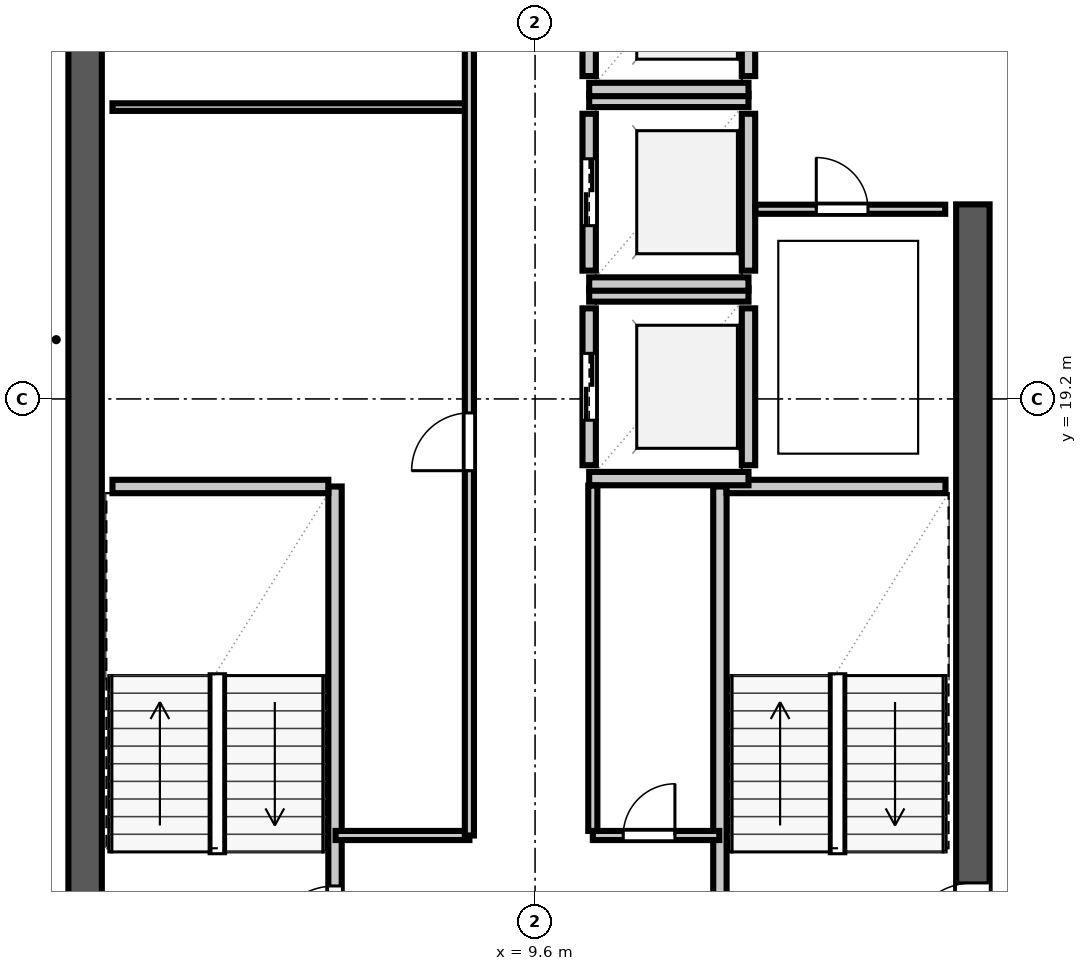
"""IFC4 building model, lengths in metres.
Left out: names, types, materials, properties, quantities, classifications, styles, units other than length and angle.
Written with IfcOpenShell. Run it as: python <this file> out.ifc"""

import sys

from ifc_helpers import new_model, si_unit, direction, frame, frame_2d, origin, place, context, subcontext, project, spatial, rectangle, extrude, element, fill, save


model = new_model("IFC4")
c1 = context("Model", 3, precision=1e-05, world=origin(), true_north=direction((0.0, 1.0)))
c2 = subcontext(c1, "Body", "Model", "MODEL_VIEW")
j1 = project(units=[si_unit("LENGTHUNIT", "METRE"), si_unit("PLANEANGLEUNIT", "RADIAN")], contexts=[c1])
p1 = place(None, origin())
s1 = spatial("IfcSite", under=j1, at=p1, CompositionType="ELEMENT")
p2 = place(p1, origin())
s2 = spatial("IfcBuilding", under=s1, at=p2, CompositionType="ELEMENT")
p3 = place(p2, frame((0.0, 0.0, 277.2)))
s3 = spatial("IfcBuildingStorey", under=s2, at=p3, CompositionType="ELEMENT", Elevation=277.2)
p4 = place(p3, frame((2.2, 9.325, 0.0), z_axis=(0.0, 0.0, 1.0), x_axis=(0.0, 1.0, 0.0)))
e1 = element("IfcWall", 1, at=p4, inside=s3, PredefinedType="SHEAR", context=c2, shape_type="SweptSolid", body=[
    extrude(rectangle(XDim=38.95, YDim=0.55, at=frame_2d((19.475, 0.0))), origin(), (0.0, 0.0, 1.0), 3.54),
])
p5 = place(p3, frame((16.8, 9.875, 0.0), z_axis=(0.0, 0.0, 1.0), x_axis=(0.0, 1.0, 0.0)))
e2 = element("IfcWall", 2, at=p5, inside=s3, PredefinedType="SHEAR", context=c2, shape_type="SweptSolid", body=[
    extrude(rectangle(XDim=12.525, YDim=0.55, at=frame_2d((6.262, 0.0))), origin(), (0.0, 0.0, 1.0), 3.54),
])
p6 = place(p5, frame((0.265, 0.0, 0.0)))
e3 = element("IfcOpeningElement", 3, at=p6, cuts=e2, PredefinedType="OPENING", context=c2, shape_type="SweptSolid", body=[
    extrude(rectangle(XDim=1.1, YDim=2.2, at=frame_2d((0.55, 1.1))), frame((0.0, 0.287, 0.0), z_axis=(0.0, -1.0, 0.0), x_axis=(1.0, 0.0, 0.0)), (0.0, 0.0, 1.0), 0.574),
])
p7 = place(p3, frame((6.31, 9.95, 0.0), z_axis=(0.0, 0.0, 1.0), x_axis=(0.0, 1.0, 0.0)))
e4 = element("IfcWall", 4, at=p7, inside=s3, PredefinedType="SOLIDWALL", context=c2, shape_type="SweptSolid", body=[
    extrude(rectangle(XDim=7.81, YDim=0.22, at=frame_2d((3.905, 0.0))), origin(), (0.0, 0.0, 1.0), 3.54),
])
p8 = place(p7, frame((0.14, 0.0, 0.0)))
e5 = element("IfcOpeningElement", 5, at=p8, cuts=e4, PredefinedType="OPENING", context=c2, shape_type="SweptSolid", body=[
    extrude(rectangle(XDim=1.1, YDim=2.2, at=frame_2d((0.55, 1.1))), frame((0.0, 0.122, 0.0), z_axis=(0.0, -1.0, 0.0), x_axis=(1.0, 0.0, 0.0)), (0.0, 0.0, 1.0), 0.244),
])
p9 = place(p3, frame((2.65, 17.76, 0.0), z_axis=(0.0, 0.0, 1.0), x_axis=(1.0, 0.0, 0.0)))
e6 = element("IfcWall", 6, at=p9, inside=s3, PredefinedType="SOLIDWALL", context=c2, shape_type="SweptSolid", body=[
    extrude(rectangle(XDim=3.55, YDim=0.22, at=frame_2d((1.775, 0.0))), origin(), (0.0, 0.0, 1.0), 3.54),
])
p10 = place(p3, frame((12.64, 10.05, 0.0), z_axis=(0.0, 0.0, 1.0), x_axis=(0.0, 1.0, 0.0)))
e7 = element("IfcWall", 7, at=p10, inside=s3, PredefinedType="SOLIDWALL", context=c2, shape_type="SweptSolid", body=[
    extrude(rectangle(XDim=7.71, YDim=0.22, at=frame_2d((3.855, 0.0))), origin(), (0.0, 0.0, 1.0), 3.54),
])
p11 = place(p3, frame((12.75, 17.76, 0.0), z_axis=(0.0, 0.0, 1.0), x_axis=(1.0, 0.0, 0.0)))
e8 = element("IfcWall", 8, at=p11, inside=s3, PredefinedType="SOLIDWALL", context=c2, shape_type="SweptSolid", body=[
    extrude(rectangle(XDim=3.6, YDim=0.22, at=frame_2d((1.8, 0.0))), origin(), (0.0, 0.0, 1.0), 3.54),
])
p12 = place(p3, frame((10.49, 18.11, 0.0), z_axis=(0.0, 0.0, 1.0), x_axis=(0.0, 1.0, 0.0)))
e9 = element("IfcWall", 9, at=p12, inside=s3, PredefinedType="SOLIDWALL", context=c2, shape_type="SweptSolid", body=[
    extrude(rectangle(XDim=2.58, YDim=0.22, at=frame_2d((1.29, 0.0))), origin(), (0.0, 0.0, 1.0), 3.54),
])
p13 = place(p12, frame((0.74, 0.0, 0.0)))
e10 = element("IfcOpeningElement", 10, at=p13, cuts=e9, PredefinedType="OPENING", context=c2, shape_type="SweptSolid", body=[
    extrude(rectangle(XDim=1.1, YDim=2.2, at=frame_2d((0.55, 1.1))), frame((0.0, 0.122, 0.0), z_axis=(0.0, -1.0, 0.0), x_axis=(1.0, 0.0, 0.0)), (0.0, 0.0, 1.0), 0.244),
])
p14 = place(p3, frame((13.11, 18.11, 0.0), z_axis=(0.0, 0.0, 1.0), x_axis=(0.0, 1.0, 0.0)))
e11 = element("IfcWall", 11, at=p14, inside=s3, PredefinedType="SOLIDWALL", context=c2, shape_type="SweptSolid", body=[
    extrude(rectangle(XDim=2.58, YDim=0.22, at=frame_2d((1.29, 0.0))), origin(), (0.0, 0.0, 1.0), 3.54),
])
for number, where, z_axis, x_axis in (
    (12, (10.49, 17.89, 0.0), (0.0, 0.0, 1.0), (1.0, 0.0, 0.0)),
    (13, (10.49, 20.91, 0.0), (0.0, 0.0, 1.0), (1.0, 0.0, 0.0)),
):
    element("IfcWall", number, at=place(p3, frame(where, z_axis=z_axis, x_axis=x_axis)), inside=s3, PredefinedType="SOLIDWALL", context=c2, shape_type="SweptSolid", body=[
        extrude(rectangle(XDim=2.62, YDim=0.22, at=frame_2d((1.31, 0.0))), origin(), (0.0, 0.0, 1.0), 3.54),
    ])
p15 = place(p3, frame((10.49, 21.31, 0.0), z_axis=(0.0, 0.0, 1.0), x_axis=(0.0, 1.0, 0.0)))
e14 = element("IfcWall", 14, at=p15, inside=s3, PredefinedType="SOLIDWALL", context=c2, shape_type="SweptSolid", body=[
    extrude(rectangle(XDim=2.58, YDim=0.22, at=frame_2d((1.29, 0.0))), origin(), (0.0, 0.0, 1.0), 3.54),
])
p16 = place(p15, frame((0.74, 0.0, 0.0)))
e15 = element("IfcOpeningElement", 15, at=p16, cuts=e14, PredefinedType="OPENING", context=c2, shape_type="SweptSolid", body=[
    extrude(rectangle(XDim=1.1, YDim=2.2, at=frame_2d((0.55, 1.1))), frame((0.0, 0.122, 0.0), z_axis=(0.0, -1.0, 0.0), x_axis=(1.0, 0.0, 0.0)), (0.0, 0.0, 1.0), 0.244),
])
p17 = place(p3, frame((13.11, 21.31, 0.0), z_axis=(0.0, 0.0, 1.0), x_axis=(0.0, 1.0, 0.0)))
e16 = element("IfcWall", 16, at=p17, inside=s3, PredefinedType="SOLIDWALL", context=c2, shape_type="SweptSolid", body=[
    extrude(rectangle(XDim=2.58, YDim=0.22, at=frame_2d((1.29, 0.0))), origin(), (0.0, 0.0, 1.0), 3.54),
])
for number, where, z_axis, x_axis in (
    (17, (10.49, 21.09, 0.0), (0.0, 0.0, 1.0), (1.0, 0.0, 0.0)),
    (18, (10.49, 24.11, 0.0), (0.0, 0.0, 1.0), (1.0, 0.0, 0.0)),
):
    element("IfcWall", number, at=place(p3, frame(where, z_axis=z_axis, x_axis=x_axis)), inside=s3, PredefinedType="SOLIDWALL", context=c2, shape_type="SweptSolid", body=[
        extrude(rectangle(XDim=2.62, YDim=0.22, at=frame_2d((1.31, 0.0))), origin(), (0.0, 0.0, 1.0), 3.54),
    ])
p18 = place(p3, frame((10.49, 24.51, 0.0), z_axis=(0.0, 0.0, 1.0), x_axis=(0.0, 1.0, 0.0)))
e19 = element("IfcWall", 19, at=p18, inside=s3, PredefinedType="SOLIDWALL", context=c2, shape_type="SweptSolid", body=[
    extrude(rectangle(XDim=2.58, YDim=0.22, at=frame_2d((1.29, 0.0))), origin(), (0.0, 0.0, 1.0), 3.54),
])
p19 = place(p18, frame((0.74, 0.0, 0.0)))
e20 = element("IfcOpeningElement", 20, at=p19, cuts=e19, PredefinedType="OPENING", context=c2, shape_type="SweptSolid", body=[
    extrude(rectangle(XDim=1.1, YDim=2.2, at=frame_2d((0.55, 1.1))), frame((0.0, 0.122, 0.0), z_axis=(0.0, -1.0, 0.0), x_axis=(1.0, 0.0, 0.0)), (0.0, 0.0, 1.0), 0.244),
])
p20 = place(p3, frame((13.11, 24.51, 0.0), z_axis=(0.0, 0.0, 1.0), x_axis=(0.0, 1.0, 0.0)))
e21 = element("IfcWall", 21, at=p20, inside=s3, PredefinedType="SOLIDWALL", context=c2, shape_type="SweptSolid", body=[
    extrude(rectangle(XDim=2.58, YDim=0.22, at=frame_2d((1.29, 0.0))), origin(), (0.0, 0.0, 1.0), 3.54),
])
p21 = place(p3, frame((10.49, 24.29, 0.0), z_axis=(0.0, 0.0, 1.0), x_axis=(1.0, 0.0, 0.0)))
e22 = element("IfcWall", 22, at=p21, inside=s3, PredefinedType="SOLIDWALL", context=c2, shape_type="SweptSolid", body=[
    extrude(rectangle(XDim=2.62, YDim=0.22, at=frame_2d((1.31, 0.0))), origin(), (0.0, 0.0, 1.0), 3.54),
])
p22 = place(p3, frame((10.55, 12.02, 0.0), z_axis=(0.0, 0.0, 1.0), x_axis=(1.0, 0.0, 0.0)))
e23 = element("IfcWall", 23, at=p22, inside=s3, PredefinedType="PARTITIONING", context=c2, shape_type="SweptSolid", body=[
    extrude(rectangle(XDim=2.08, YDim=0.15, at=frame_2d((1.04, 0.0))), origin(), (0.0, 0.0, 1.0), 3.54),
])
p23 = place(p22, frame((0.5, 0.0, 0.0)))
e24 = element("IfcOpeningElement", 24, at=p23, cuts=e23, PredefinedType="OPENING", context=c2, shape_type="SweptSolid", body=[
    extrude(rectangle(XDim=0.85, YDim=2.1, at=frame_2d((0.425, 1.05))), frame((0.0, 0.087, 0.0), z_axis=(0.0, -1.0, 0.0), x_axis=(1.0, 0.0, 0.0)), (0.0, 0.0, 1.0), 0.174),
])
p24 = place(p3, frame((10.55, 12.095, 0.0), z_axis=(0.0, 0.0, 1.0), x_axis=(0.0, 1.0, 0.0)))
e25 = element("IfcWall", 25, at=p24, inside=s3, PredefinedType="PARTITIONING", context=c2, shape_type="SweptSolid", body=[
    extrude(rectangle(XDim=5.68, YDim=0.15, at=frame_2d((2.84, 0.0))), origin(), (0.0, 0.0, 1.0), 3.54),
])
p25 = place(p3, frame((13.225, 22.32, 0.0), z_axis=(0.0, 0.0, 1.0), x_axis=(1.0, 0.0, 0.0)))
e26 = element("IfcWall", 26, at=p25, inside=s3, PredefinedType="PARTITIONING", context=c2, shape_type="SweptSolid", body=[
    extrude(rectangle(XDim=3.12, YDim=0.15, at=frame_2d((1.56, 0.0))), origin(), (0.0, 0.0, 1.0), 3.54),
])
p26 = place(p25, frame((1.0, 0.0, 0.0)))
e27 = element("IfcOpeningElement", 27, at=p26, cuts=e26, PredefinedType="OPENING", context=c2, shape_type="SweptSolid", body=[
    extrude(rectangle(XDim=0.85, YDim=2.1, at=frame_2d((0.425, 1.05))), frame((0.0, 0.087, 0.0), z_axis=(0.0, -1.0, 0.0), x_axis=(1.0, 0.0, 0.0)), (0.0, 0.0, 1.0), 0.174),
])
p27 = place(p3, frame((6.32, 12.02, 0.0), z_axis=(0.0, 0.0, 1.0), x_axis=(1.0, 0.0, 0.0)))
e28 = element("IfcWall", 28, at=p27, inside=s3, PredefinedType="PARTITIONING", context=c2, shape_type="SweptSolid", body=[
    extrude(rectangle(XDim=2.2, YDim=0.15, at=frame_2d((1.1, 0.0))), origin(), (0.0, 0.0, 1.0), 3.54),
])
p28 = place(p3, frame((2.65, 24.0, 0.0), z_axis=(0.0, 0.0, 1.0), x_axis=(1.0, 0.0, 0.0)))
e29 = element("IfcWall", 29, at=p28, inside=s3, PredefinedType="PARTITIONING", context=c2, shape_type="SweptSolid", body=[
    extrude(rectangle(XDim=5.87, YDim=0.125, at=frame_2d((2.935, 0.0))), origin(), (0.0, 0.0, 1.0), 3.54),
])
p29 = place(p3, frame((8.52, 12.02, 0.0), z_axis=(0.0, 0.0, 1.0), x_axis=(0.0, 1.0, 0.0)))
e30 = element("IfcWall", 30, at=p29, inside=s3, PredefinedType="PARTITIONING", context=c2, shape_type="SweptSolid", body=[
    extrude(rectangle(XDim=24.76, YDim=0.15, at=frame_2d((12.38, 0.0))), origin(), (0.0, 0.0, 1.0), 3.54),
])
p30 = place(p29, frame((6.0, 0.0, 0.0)))
e31 = element("IfcOpeningElement", 31, at=p30, cuts=e30, PredefinedType="OPENING", context=c2, shape_type="SweptSolid", body=[
    extrude(rectangle(XDim=0.95, YDim=2.15, at=frame_2d((0.475, 1.075))), frame((0.0, 0.087, 0.0), z_axis=(0.0, -1.0, 0.0), x_axis=(1.0, 0.0, 0.0)), (0.0, 0.0, 1.0), 0.174),
])
p31 = place(p29, frame((14.0, 0.0, 0.0)))
e32 = element("IfcOpeningElement", 32, at=p31, cuts=e30, PredefinedType="OPENING", context=c2, shape_type="SweptSolid", body=[
    extrude(rectangle(XDim=0.95, YDim=2.15, at=frame_2d((0.475, 1.075))), frame((0.0, 0.087, 0.0), z_axis=(0.0, -1.0, 0.0), x_axis=(1.0, 0.0, 0.0)), (0.0, 0.0, 1.0), 0.174),
])
p32 = place(p8, origin())
e33 = element("IfcDoor", 33, at=p32, inside=s3, OperationType="SINGLE_SWING_LEFT", PredefinedType="DOOR", context=c2, shape_type="SweptSolid", body=[
    extrude(rectangle(XDim=1.1, YDim=2.2, at=frame_2d((0.55, 1.1))), frame((0.0, 0.025, 0.0), z_axis=(0.0, -1.0, 0.0), x_axis=(1.0, 0.0, 0.0)), (0.0, 0.0, 1.0), 0.05),
])
fill(e5, e33)
p33 = place(p6, origin())
e34 = element("IfcDoor", 34, at=p33, inside=s3, OperationType="SINGLE_SWING_LEFT", PredefinedType="DOOR", context=c2, shape_type="SweptSolid", body=[
    extrude(rectangle(XDim=1.1, YDim=2.2, at=frame_2d((0.55, 1.1))), frame((0.0, 0.025, 0.0), z_axis=(0.0, -1.0, 0.0), x_axis=(1.0, 0.0, 0.0)), (0.0, 0.0, 1.0), 0.05),
])
fill(e3, e34)
p34 = place(p13, origin())
e35 = element("IfcDoor", 35, at=p34, inside=s3, OperationType="DOUBLE_DOOR_SLIDING", PredefinedType="DOOR", context=c2, shape_type="SweptSolid", body=[
    extrude(rectangle(XDim=1.1, YDim=2.2, at=frame_2d((0.55, 1.1))), frame((0.0, 0.025, 0.0), z_axis=(0.0, -1.0, 0.0), x_axis=(1.0, 0.0, 0.0)), (0.0, 0.0, 1.0), 0.05),
])
fill(e10, e35)
p35 = place(p16, origin())
e36 = element("IfcDoor", 36, at=p35, inside=s3, OperationType="DOUBLE_DOOR_SLIDING", PredefinedType="DOOR", context=c2, shape_type="SweptSolid", body=[
    extrude(rectangle(XDim=1.1, YDim=2.2, at=frame_2d((0.55, 1.1))), frame((0.0, 0.025, 0.0), z_axis=(0.0, -1.0, 0.0), x_axis=(1.0, 0.0, 0.0)), (0.0, 0.0, 1.0), 0.05),
])
fill(e15, e36)
p36 = place(p23, origin())
e37 = element("IfcDoor", 37, at=p36, inside=s3, OperationType="SINGLE_SWING_RIGHT", PredefinedType="DOOR", context=c2, shape_type="SweptSolid", body=[
    extrude(rectangle(XDim=0.85, YDim=2.1, at=frame_2d((0.425, 1.05))), frame((0.0, 0.025, 0.0), z_axis=(0.0, -1.0, 0.0), x_axis=(1.0, 0.0, 0.0)), (0.0, 0.0, 1.0), 0.05),
])
fill(e24, e37)
p37 = place(p26, origin())
e38 = element("IfcDoor", 38, at=p37, inside=s3, OperationType="SINGLE_SWING_LEFT", PredefinedType="DOOR", context=c2, shape_type="SweptSolid", body=[
    extrude(rectangle(XDim=0.85, YDim=2.1, at=frame_2d((0.425, 1.05))), frame((0.0, 0.025, 0.0), z_axis=(0.0, -1.0, 0.0), x_axis=(1.0, 0.0, 0.0)), (0.0, 0.0, 1.0), 0.05),
])
fill(e27, e38)
p38 = place(p30, origin())
e39 = element("IfcDoor", 39, at=p38, inside=s3, OperationType="SINGLE_SWING_LEFT", PredefinedType="DOOR", context=c2, shape_type="SweptSolid", body=[
    extrude(rectangle(XDim=0.95, YDim=2.15, at=frame_2d((0.475, 1.075))), frame((0.0, 0.025, 0.0), z_axis=(0.0, -1.0, 0.0), x_axis=(1.0, 0.0, 0.0)), (0.0, 0.0, 1.0), 0.05),
])
fill(e31, e39)
save(model, sys.argv[1])
